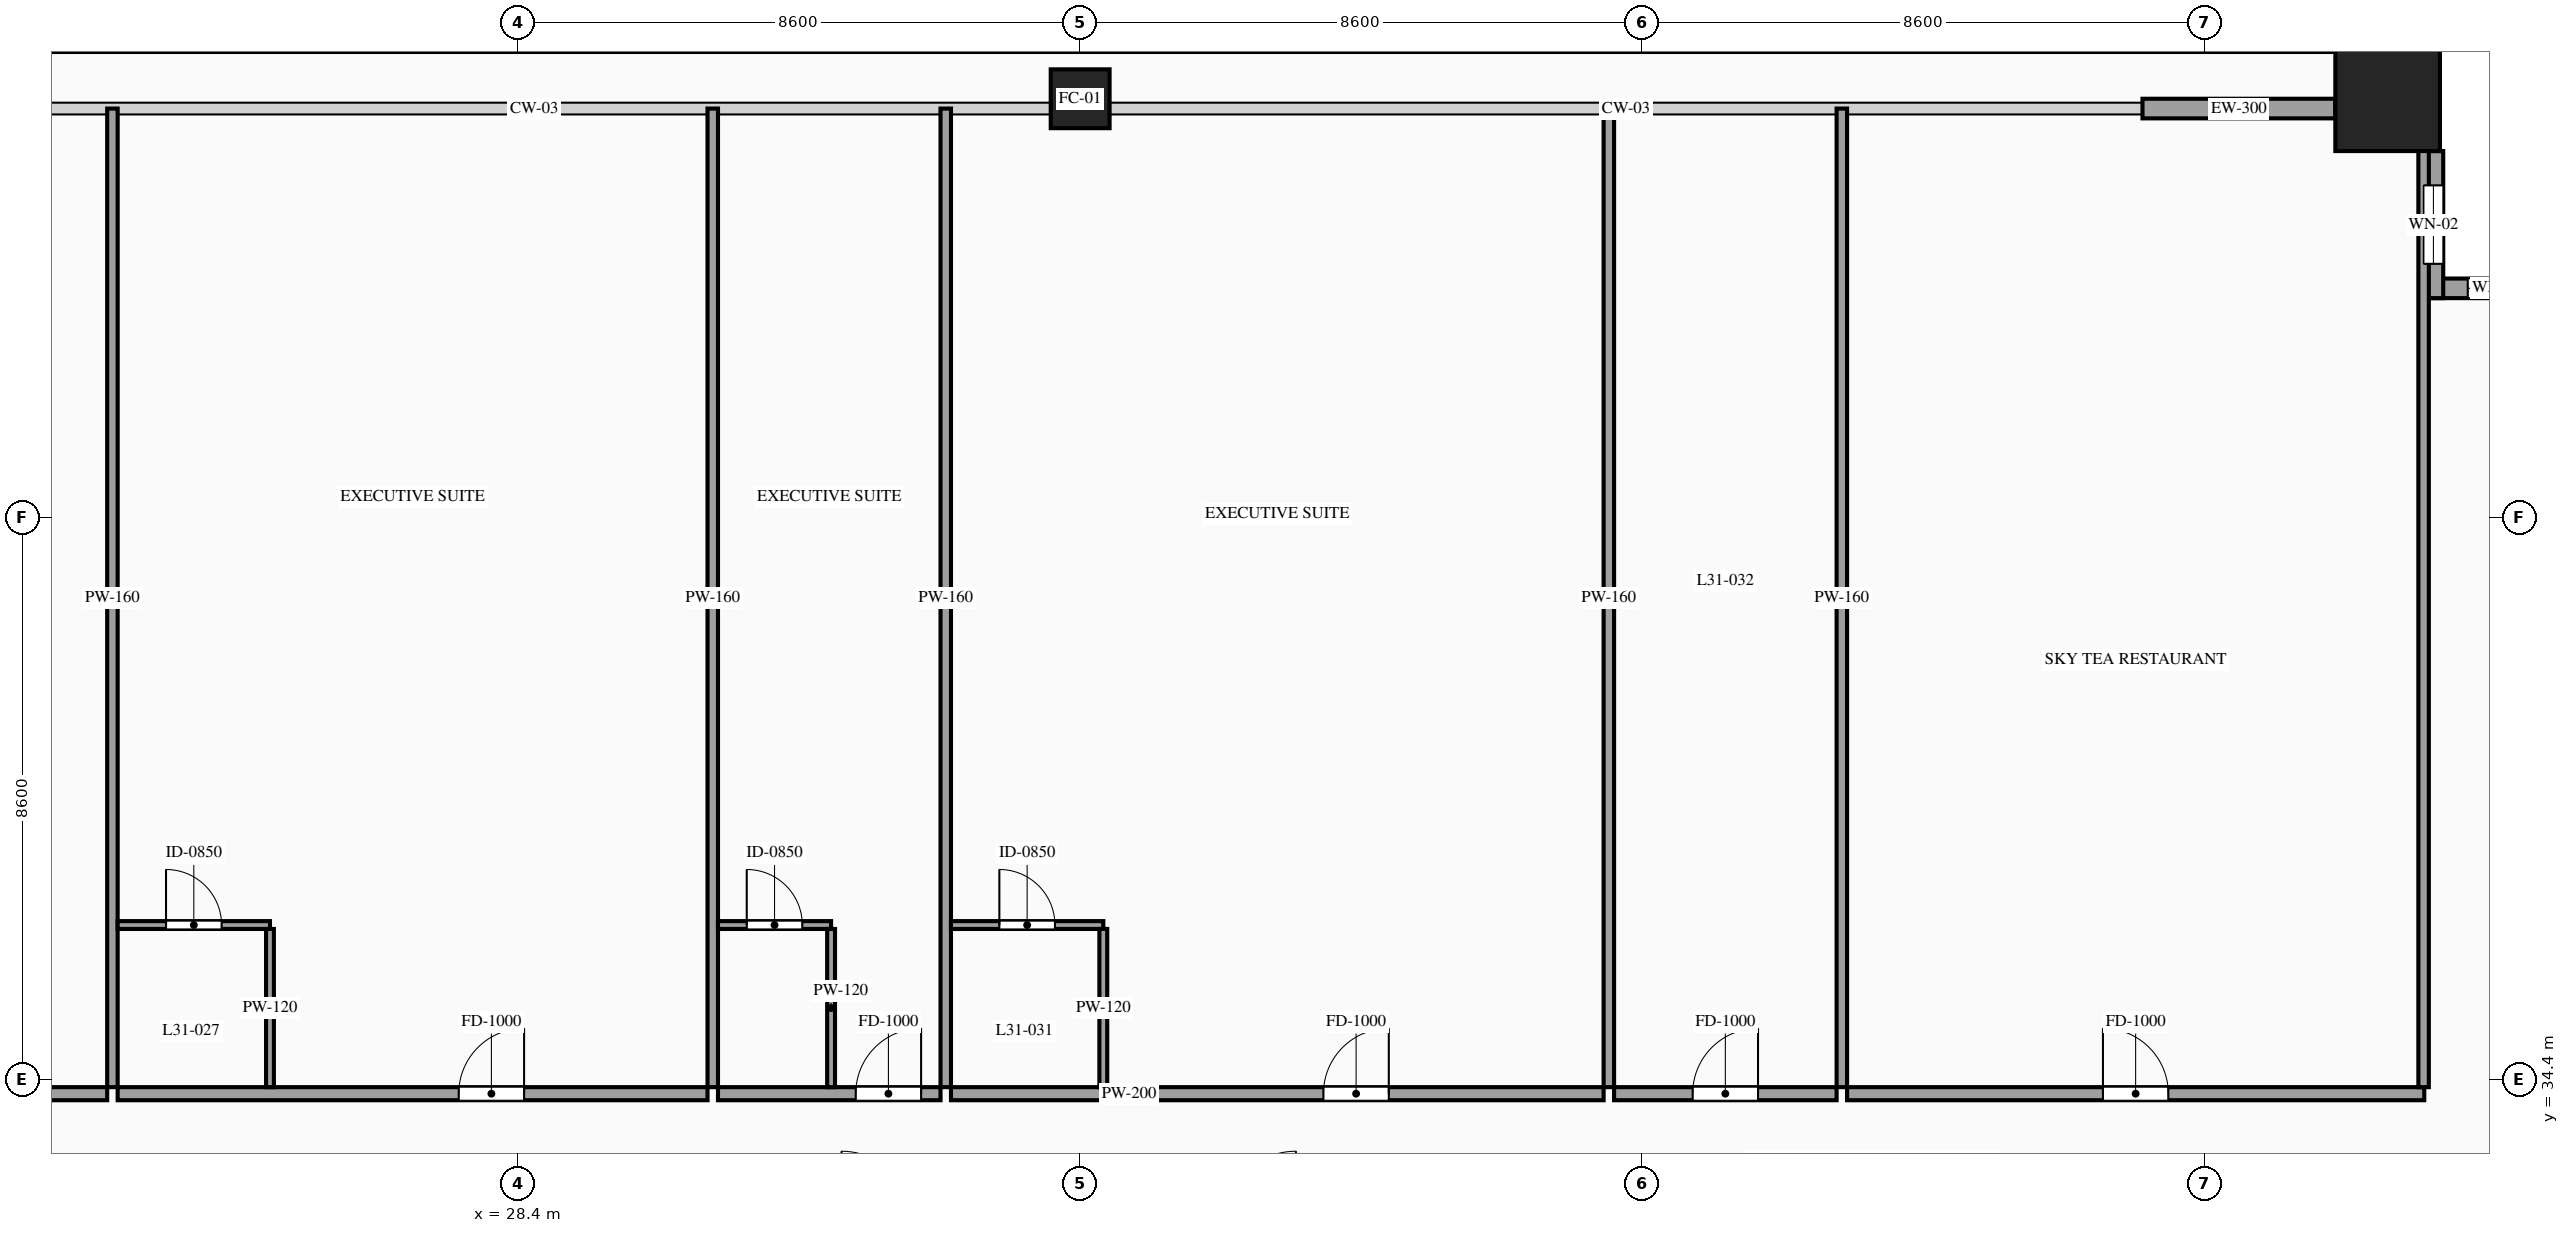
"""IFC4 building model, lengths in metres.
Left out: names, types, materials, properties, quantities, classifications, styles, units other than length and angle.
Written with IfcOpenShell. Run it as: python <this file> out.ifc"""

import sys

from ifc_helpers import new_model, si_unit, direction, frame, frame_2d, origin, origin_2d, place, context, subcontext, project, spatial, rectangle, hollow_rectangle, extrude, source, transform, mapped, element, fill, save


model = new_model("IFC4")
c1 = context("Model", 3, precision=1e-05, world=origin(), true_north=direction((0.0, 1.0)))
c2 = subcontext(c1, "Body", "Model", "MODEL_VIEW")
j1 = project(units=[si_unit("LENGTHUNIT", "METRE"), si_unit("PLANEANGLEUNIT", "RADIAN")], contexts=[c1])
p1 = place(None, origin())
s1 = spatial("IfcSite", under=j1, at=p1, CompositionType="ELEMENT")
p2 = place(p1, origin())
s2 = spatial("IfcBuilding", under=s1, at=p2, CompositionType="ELEMENT")
p3 = place(p2, frame((0.0, 0.0, 119.0)))
s3 = spatial("IfcBuildingStorey", under=s2, at=p3, CompositionType="ELEMENT", Elevation=119.0)
m1 = source(origin(), c2, "Body", "SweptSolid", [
    extrude(hollow_rectangle(XDim=0.9, YDim=0.9, WallThickness=0.042, at=origin_2d()), origin(), (0.0, 0.0, 1.0), 3.6),
])
p4 = place(p3, frame((37.0, 49.4, 0.0), z_axis=(0.0, 0.0, 1.0), x_axis=(1.0, 0.0, 0.0)))
e1 = element("IfcColumn", 1, at=p4, inside=s3, PredefinedType="COLUMN", context=c2, shape_type="MappedRepresentation", body=[
    mapped(m1, transform((0.0, 0.0, 0.0), scale=1.0)),
])
m2 = source(origin(), c2, "Body", "SweptSolid", [
    extrude(hollow_rectangle(XDim=1.6, YDim=1.6, WallThickness=0.07, at=origin_2d()), origin(), (0.0, 0.0, 1.0), 3.6),
])
p5 = place(p3, frame((57.0, 49.4, 0.0), z_axis=(0.0, 0.0, 1.0), x_axis=(1.0, 0.0, 0.0)))
e2 = element("IfcColumn", 2, at=p5, inside=s3, PredefinedType="COLUMN", context=c2, shape_type="MappedRepresentation", body=[
    mapped(m2, transform((0.0, 0.0, 0.0), scale=1.0)),
])
p6 = place(p3, frame((59.8, 46.5, 0.0), z_axis=(0.0, 0.0, 1.0), x_axis=(-1.0, 0.0, 0.0)))
e3 = element("IfcWall", 3, at=p6, inside=s3, PredefinedType="SOLIDWALL", context=c2, shape_type="SweptSolid", body=[
    extrude(rectangle(XDim=2.25, YDim=0.3, at=frame_2d((1.125, 0.0))), origin(), (0.0, 0.0, 1.0), 3.38),
])
p7 = place(p6, frame((0.675, 0.0, 0.85)))
e4 = element("IfcOpeningElement", 4, at=p7, cuts=e3, PredefinedType="OPENING", context=c2, shape_type="SweptSolid", body=[
    extrude(rectangle(XDim=0.9, YDim=1.5, at=frame_2d((0.45, 0.75))), frame((0.0, 0.165, 0.0), z_axis=(0.0, -1.0, 0.0), x_axis=(1.0, 0.0, 0.0)), (0.0, 0.0, 1.0), 0.33),
])
p8 = place(p3, frame((57.7, 46.35, 0.0), z_axis=(0.0, 0.0, 1.0), x_axis=(0.0, 1.0, 0.0)))
e5 = element("IfcWall", 5, at=p8, inside=s3, PredefinedType="SOLIDWALL", context=c2, shape_type="SweptSolid", body=[
    extrude(rectangle(XDim=2.25, YDim=0.3, at=frame_2d((1.125, 0.0))), origin(), (0.0, 0.0, 1.0), 3.38),
])
p9 = place(p8, frame((0.525, 0.0, 0.85)))
e6 = element("IfcOpeningElement", 6, at=p9, cuts=e5, PredefinedType="OPENING", context=c2, shape_type="SweptSolid", body=[
    extrude(rectangle(XDim=1.2, YDim=2.1, at=frame_2d((0.6, 1.05))), frame((0.0, 0.165, 0.0), z_axis=(0.0, -1.0, 0.0), x_axis=(1.0, 0.0, 0.0)), (0.0, 0.0, 1.0), 0.33),
])
m3 = source(origin(), c2, "Body", "SweptSolid", [
    extrude(rectangle(XDim=2.95, YDim=0.3, at=frame_2d((1.475, 0.0))), origin(), (0.0, 0.0, 1.0), 2.775),
])
p10 = place(p3, frame((53.25, 49.25, 0.0), z_axis=(0.0, 0.0, 1.0), x_axis=(1.0, 0.0, 0.0)))
e7 = element("IfcWall", 7, at=p10, inside=s3, PredefinedType="SOLIDWALL", context=c2, shape_type="MappedRepresentation", body=[
    mapped(m3, transform((0.0, 0.0, 0.0), scale=1.0)),
])
p11 = place(p3, frame((16.44, 34.18, 0.0), z_axis=(0.0, 0.0, 1.0), x_axis=(1.0, 0.0, 0.0)))
e8 = element("IfcWall", 8, at=p11, inside=s3, PredefinedType="PARTITIONING", context=c2, shape_type="SweptSolid", body=[
    extrude(rectangle(XDim=5.677, YDim=0.2, at=frame_2d((2.838, 0.0))), origin(), (0.0, 0.0, 1.0), 3.38),
])
p12 = place(p11, frame((3.543, 0.0, 0.0)))
e9 = element("IfcOpeningElement", 9, at=p12, cuts=e8, PredefinedType="OPENING", context=c2, shape_type="SweptSolid", body=[
    extrude(rectangle(XDim=1.0, YDim=2.2, at=frame_2d((0.5, 1.1))), frame((0.0, 0.115, 0.0), z_axis=(0.0, -1.0, 0.0), x_axis=(1.0, 0.0, 0.0)), (0.0, 0.0, 1.0), 0.23),
])
m4 = source(origin(), c2, "Body", "SweptSolid", [
    extrude(rectangle(XDim=14.97, YDim=0.16, at=frame_2d((7.485, 0.0))), origin(), (0.0, 0.0, 1.0), 3.38),
])
p13 = place(p3, frame((22.197, 34.28, 0.0), z_axis=(0.0, 0.0, 1.0), x_axis=(0.0, 1.0, 0.0)))
e10 = element("IfcWall", 10, at=p13, inside=s3, PredefinedType="PARTITIONING", context=c2, shape_type="MappedRepresentation", body=[
    mapped(m4, transform((0.0, 0.0, 0.0), scale=1.0)),
])
p14 = place(p3, frame((22.277, 34.18, 0.0), z_axis=(0.0, 0.0, 1.0), x_axis=(1.0, 0.0, 0.0)))
e11 = element("IfcWall", 11, at=p14, inside=s3, PredefinedType="PARTITIONING", context=c2, shape_type="SweptSolid", body=[
    extrude(rectangle(XDim=9.023, YDim=0.2, at=frame_2d((4.511, 0.0))), origin(), (0.0, 0.0, 1.0), 3.38),
])
p15 = place(p14, frame((5.217, 0.0, 0.0)))
e12 = element("IfcOpeningElement", 12, at=p15, cuts=e11, PredefinedType="OPENING", context=c2, shape_type="SweptSolid", body=[
    extrude(rectangle(XDim=1.0, YDim=2.2, at=frame_2d((0.5, 1.1))), frame((0.0, 0.115, 0.0), z_axis=(0.0, -1.0, 0.0), x_axis=(1.0, 0.0, 0.0)), (0.0, 0.0, 1.0), 0.23),
])
p16 = place(p3, frame((31.38, 34.28, 0.0), z_axis=(0.0, 0.0, 1.0), x_axis=(0.0, 1.0, 0.0)))
e13 = element("IfcWall", 13, at=p16, inside=s3, PredefinedType="PARTITIONING", context=c2, shape_type="MappedRepresentation", body=[
    mapped(m4, transform((0.0, 0.0, 0.0), scale=1.0)),
])
p17 = place(p3, frame((22.277, 36.76, 0.0), z_axis=(0.0, 0.0, 1.0), x_axis=(1.0, 0.0, 0.0)))
e14 = element("IfcWall", 14, at=p17, inside=s3, PredefinedType="PARTITIONING", context=c2, shape_type="SweptSolid", body=[
    extrude(rectangle(XDim=2.33, YDim=0.12, at=frame_2d((1.165, 0.0))), origin(), (0.0, 0.0, 1.0), 3.38),
])
p18 = place(p17, frame((0.74, 0.0, 0.0)))
e15 = element("IfcOpeningElement", 15, at=p18, cuts=e14, PredefinedType="OPENING", context=c2, shape_type="SweptSolid", body=[
    extrude(rectangle(XDim=0.85, YDim=2.1, at=frame_2d((0.425, 1.05))), frame((0.0, 0.075, 0.0), z_axis=(0.0, -1.0, 0.0), x_axis=(1.0, 0.0, 0.0)), (0.0, 0.0, 1.0), 0.15),
])
m5 = source(origin(), c2, "Body", "SweptSolid", [
    extrude(rectangle(XDim=2.42, YDim=0.12, at=frame_2d((1.21, 0.0))), origin(), (0.0, 0.0, 1.0), 3.38),
])
p19 = place(p3, frame((24.607, 34.28, 0.0), z_axis=(0.0, 0.0, 1.0), x_axis=(0.0, 1.0, 0.0)))
e16 = element("IfcWall", 16, at=p19, inside=s3, PredefinedType="PARTITIONING", context=c2, shape_type="MappedRepresentation", body=[
    mapped(m5, transform((0.0, 0.0, 0.0), scale=1.0)),
])
p20 = place(p3, frame((31.46, 34.18, 0.0), z_axis=(0.0, 0.0, 1.0), x_axis=(1.0, 0.0, 0.0)))
e17 = element("IfcWall", 17, at=p20, inside=s3, PredefinedType="PARTITIONING", context=c2, shape_type="SweptSolid", body=[
    extrude(rectangle(XDim=3.404, YDim=0.2, at=frame_2d((1.702, 0.0))), origin(), (0.0, 0.0, 1.0), 3.38),
])
p21 = place(p20, frame((2.107, 0.0, 0.0)))
e18 = element("IfcOpeningElement", 18, at=p21, cuts=e17, PredefinedType="OPENING", context=c2, shape_type="SweptSolid", body=[
    extrude(rectangle(XDim=1.0, YDim=2.2, at=frame_2d((0.5, 1.1))), frame((0.0, 0.115, 0.0), z_axis=(0.0, -1.0, 0.0), x_axis=(1.0, 0.0, 0.0)), (0.0, 0.0, 1.0), 0.23),
])
p22 = place(p3, frame((34.944, 34.28, 0.0), z_axis=(0.0, 0.0, 1.0), x_axis=(0.0, 1.0, 0.0)))
e19 = element("IfcWall", 19, at=p22, inside=s3, PredefinedType="PARTITIONING", context=c2, shape_type="MappedRepresentation", body=[
    mapped(m4, transform((0.0, 0.0, 0.0), scale=1.0)),
])
p23 = place(p3, frame((31.46, 36.76, 0.0), z_axis=(0.0, 0.0, 1.0), x_axis=(1.0, 0.0, 0.0)))
e20 = element("IfcWall", 20, at=p23, inside=s3, PredefinedType="PARTITIONING", context=c2, shape_type="SweptSolid", body=[
    extrude(rectangle(XDim=1.73, YDim=0.12, at=frame_2d((0.865, 0.0))), origin(), (0.0, 0.0, 1.0), 3.38),
])
p24 = place(p23, frame((0.44, 0.0, 0.0)))
e21 = element("IfcOpeningElement", 21, at=p24, cuts=e20, PredefinedType="OPENING", context=c2, shape_type="SweptSolid", body=[
    extrude(rectangle(XDim=0.85, YDim=2.1, at=frame_2d((0.425, 1.05))), frame((0.0, 0.075, 0.0), z_axis=(0.0, -1.0, 0.0), x_axis=(1.0, 0.0, 0.0)), (0.0, 0.0, 1.0), 0.15),
])
p25 = place(p3, frame((33.19, 34.28, 0.0), z_axis=(0.0, 0.0, 1.0), x_axis=(0.0, 1.0, 0.0)))
e22 = element("IfcWall", 22, at=p25, inside=s3, PredefinedType="PARTITIONING", context=c2, shape_type="MappedRepresentation", body=[
    mapped(m5, transform((0.0, 0.0, 0.0), scale=1.0)),
])
p26 = place(p3, frame((35.024, 34.18, 0.0), z_axis=(0.0, 0.0, 1.0), x_axis=(1.0, 0.0, 0.0)))
e23 = element("IfcWall", 23, at=p26, inside=s3, PredefinedType="PARTITIONING", context=c2, shape_type="SweptSolid", body=[
    extrude(rectangle(XDim=9.983, YDim=0.2, at=frame_2d((4.992, 0.0))), origin(), (0.0, 0.0, 1.0), 3.38),
])
p27 = place(p26, frame((5.697, 0.0, 0.0)))
e24 = element("IfcOpeningElement", 24, at=p27, cuts=e23, PredefinedType="OPENING", context=c2, shape_type="SweptSolid", body=[
    extrude(rectangle(XDim=1.0, YDim=2.2, at=frame_2d((0.5, 1.1))), frame((0.0, 0.115, 0.0), z_axis=(0.0, -1.0, 0.0), x_axis=(1.0, 0.0, 0.0)), (0.0, 0.0, 1.0), 0.23),
])
p28 = place(p3, frame((45.087, 34.28, 0.0), z_axis=(0.0, 0.0, 1.0), x_axis=(0.0, 1.0, 0.0)))
e25 = element("IfcWall", 25, at=p28, inside=s3, PredefinedType="PARTITIONING", context=c2, shape_type="MappedRepresentation", body=[
    mapped(m4, transform((0.0, 0.0, 0.0), scale=1.0)),
])
p29 = place(p3, frame((35.024, 36.76, 0.0), z_axis=(0.0, 0.0, 1.0), x_axis=(1.0, 0.0, 0.0)))
e26 = element("IfcWall", 26, at=p29, inside=s3, PredefinedType="PARTITIONING", context=c2, shape_type="SweptSolid", body=[
    extrude(rectangle(XDim=2.33, YDim=0.12, at=frame_2d((1.165, 0.0))), origin(), (0.0, 0.0, 1.0), 3.38),
])
p30 = place(p29, frame((0.74, 0.0, 0.0)))
e27 = element("IfcOpeningElement", 27, at=p30, cuts=e26, PredefinedType="OPENING", context=c2, shape_type="SweptSolid", body=[
    extrude(rectangle(XDim=0.85, YDim=2.1, at=frame_2d((0.425, 1.05))), frame((0.0, 0.075, 0.0), z_axis=(0.0, -1.0, 0.0), x_axis=(1.0, 0.0, 0.0)), (0.0, 0.0, 1.0), 0.15),
])
p31 = place(p3, frame((37.354, 34.28, 0.0), z_axis=(0.0, 0.0, 1.0), x_axis=(0.0, 1.0, 0.0)))
e28 = element("IfcWall", 28, at=p31, inside=s3, PredefinedType="PARTITIONING", context=c2, shape_type="MappedRepresentation", body=[
    mapped(m5, transform((0.0, 0.0, 0.0), scale=1.0)),
])
p32 = place(p3, frame((45.167, 34.18, 0.0), z_axis=(0.0, 0.0, 1.0), x_axis=(1.0, 0.0, 0.0)))
e29 = element("IfcWall", 29, at=p32, inside=s3, PredefinedType="PARTITIONING", context=c2, shape_type="SweptSolid", body=[
    extrude(rectangle(XDim=3.404, YDim=0.2, at=frame_2d((1.702, 0.0))), origin(), (0.0, 0.0, 1.0), 3.38),
])
p33 = place(p32, frame((1.202, 0.0, 0.0)))
e30 = element("IfcOpeningElement", 30, at=p33, cuts=e29, PredefinedType="OPENING", context=c2, shape_type="SweptSolid", body=[
    extrude(rectangle(XDim=1.0, YDim=2.2, at=frame_2d((0.5, 1.1))), frame((0.0, 0.115, 0.0), z_axis=(0.0, -1.0, 0.0), x_axis=(1.0, 0.0, 0.0)), (0.0, 0.0, 1.0), 0.23),
])
p34 = place(p3, frame((48.651, 34.28, 0.0), z_axis=(0.0, 0.0, 1.0), x_axis=(0.0, 1.0, 0.0)))
e31 = element("IfcWall", 31, at=p34, inside=s3, PredefinedType="PARTITIONING", context=c2, shape_type="MappedRepresentation", body=[
    mapped(m4, transform((0.0, 0.0, 0.0), scale=1.0)),
])
p35 = place(p3, frame((48.731, 34.18, 0.0), z_axis=(0.0, 0.0, 1.0), x_axis=(1.0, 0.0, 0.0)))
e32 = element("IfcWall", 32, at=p35, inside=s3, PredefinedType="PARTITIONING", context=c2, shape_type="SweptSolid", body=[
    extrude(rectangle(XDim=8.829, YDim=0.2, at=frame_2d((4.415, 0.0))), origin(), (0.0, 0.0, 1.0), 3.38),
])
p36 = place(p35, frame((3.914, 0.0, 0.0)))
e33 = element("IfcOpeningElement", 33, at=p36, cuts=e32, PredefinedType="OPENING", context=c2, shape_type="SweptSolid", body=[
    extrude(rectangle(XDim=1.0, YDim=2.2, at=frame_2d((0.5, 1.1))), frame((0.0, 0.115, 0.0), z_axis=(0.0, -1.0, 0.0), x_axis=(1.0, 0.0, 0.0)), (0.0, 0.0, 1.0), 0.23),
])
m6 = source(origin(), c2, "Body", "SweptSolid", [
    extrude(rectangle(XDim=14.82, YDim=0.16, at=frame_2d((7.41, 0.0))), origin(), (0.0, 0.0, 1.0), 3.38),
])
p37 = place(p3, frame((57.55, 34.28, 0.0), z_axis=(0.0, 0.0, 1.0), x_axis=(0.0, 1.0, 0.0)))
e34 = element("IfcWall", 34, at=p37, inside=s3, PredefinedType="PARTITIONING", context=c2, shape_type="MappedRepresentation", body=[
    mapped(m6, transform((0.0, 0.0, 0.0), scale=1.0)),
])
m7 = source(origin(), c2, "Body", "SweptSolid", [
    extrude(rectangle(XDim=0.9, YDim=1.5, at=frame_2d((0.45, 0.75))), frame((0.0, 0.03, 0.0), z_axis=(0.0, -1.0, 0.0), x_axis=(1.0, 0.0, 0.0)), (0.0, 0.0, 1.0), 0.06),
])
p38 = place(p7, origin())
e35 = element("IfcWindow", 35, at=p38, inside=s3, PartitioningType="SINGLE_PANEL", PredefinedType="WINDOW", context=c2, shape_type="MappedRepresentation", body=[
    mapped(m7, transform((0.0, 0.0, 0.0), scale=1.0)),
])
fill(e4, e35)
m8 = source(origin(), c2, "Body", "SweptSolid", [
    extrude(rectangle(XDim=1.2, YDim=2.1, at=frame_2d((0.6, 1.05))), frame((0.0, 0.03, 0.0), z_axis=(0.0, -1.0, 0.0), x_axis=(1.0, 0.0, 0.0)), (0.0, 0.0, 1.0), 0.06),
])
p39 = place(p9, origin())
e36 = element("IfcWindow", 36, at=p39, inside=s3, PartitioningType="SINGLE_PANEL", PredefinedType="WINDOW", context=c2, shape_type="MappedRepresentation", body=[
    mapped(m8, transform((0.0, 0.0, 0.0), scale=1.0)),
])
fill(e6, e36)
m9 = source(origin(), c2, "Body", "SweptSolid", [
    extrude(rectangle(XDim=1.0, YDim=2.2, at=frame_2d((0.5, 1.1))), frame((0.0, 0.025, 0.0), z_axis=(0.0, -1.0, 0.0), x_axis=(1.0, 0.0, 0.0)), (0.0, 0.0, 1.0), 0.05),
])
p40 = place(p15, origin())
e37 = element("IfcDoor", 37, at=p40, inside=s3, OperationType="SINGLE_SWING_RIGHT", PredefinedType="DOOR", context=c2, shape_type="MappedRepresentation", body=[
    mapped(m9, transform((0.0, 0.0, 0.0), scale=1.0)),
])
fill(e12, e37)
m10 = source(origin(), c2, "Body", "SweptSolid", [
    extrude(rectangle(XDim=0.85, YDim=2.1, at=frame_2d((0.425, 1.05))), frame((0.0, 0.025, 0.0), z_axis=(0.0, -1.0, 0.0), x_axis=(1.0, 0.0, 0.0)), (0.0, 0.0, 1.0), 0.05),
])
p41 = place(p18, origin())
e38 = element("IfcDoor", 38, at=p41, inside=s3, OperationType="SINGLE_SWING_LEFT", PredefinedType="DOOR", context=c2, shape_type="MappedRepresentation", body=[
    mapped(m10, transform((0.0, 0.0, 0.0), scale=1.0)),
])
fill(e15, e38)
p42 = place(p21, origin())
e39 = element("IfcDoor", 39, at=p42, inside=s3, OperationType="SINGLE_SWING_RIGHT", PredefinedType="DOOR", context=c2, shape_type="MappedRepresentation", body=[
    mapped(m9, transform((0.0, 0.0, 0.0), scale=1.0)),
])
fill(e18, e39)
p43 = place(p24, origin())
e40 = element("IfcDoor", 40, at=p43, inside=s3, OperationType="SINGLE_SWING_LEFT", PredefinedType="DOOR", context=c2, shape_type="MappedRepresentation", body=[
    mapped(m10, transform((0.0, 0.0, 0.0), scale=1.0)),
])
fill(e21, e40)
p44 = place(p27, origin())
e41 = element("IfcDoor", 41, at=p44, inside=s3, OperationType="SINGLE_SWING_RIGHT", PredefinedType="DOOR", context=c2, shape_type="MappedRepresentation", body=[
    mapped(m9, transform((0.0, 0.0, 0.0), scale=1.0)),
])
fill(e24, e41)
p45 = place(p30, origin())
e42 = element("IfcDoor", 42, at=p45, inside=s3, OperationType="SINGLE_SWING_LEFT", PredefinedType="DOOR", context=c2, shape_type="MappedRepresentation", body=[
    mapped(m10, transform((0.0, 0.0, 0.0), scale=1.0)),
])
fill(e27, e42)
p46 = place(p33, origin())
e43 = element("IfcDoor", 43, at=p46, inside=s3, OperationType="SINGLE_SWING_RIGHT", PredefinedType="DOOR", context=c2, shape_type="MappedRepresentation", body=[
    mapped(m9, transform((0.0, 0.0, 0.0), scale=1.0)),
])
fill(e30, e43)
p47 = place(p36, origin())
e44 = element("IfcDoor", 44, at=p47, inside=s3, OperationType="SINGLE_SWING_LEFT", PredefinedType="DOOR", context=c2, shape_type="MappedRepresentation", body=[
    mapped(m9, transform((0.0, 0.0, 0.0), scale=1.0)),
])
fill(e33, e44)
save(model, sys.argv[1])
